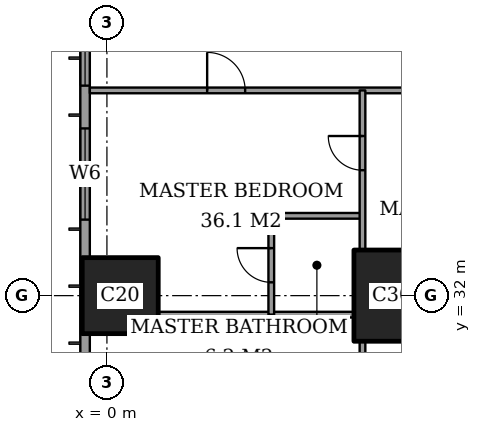
"""IFC4 building model, lengths in metres.
Left out: names, types, materials, properties, quantities, classifications, styles, units other than length and angle.
Written with IfcOpenShell. Run it as: python <this file> out.ifc"""

import sys

from ifc_helpers import new_model, si_unit, direction, frame, frame_2d, origin, origin_2d, place, context, subcontext, project, spatial, rectangle, extrude, element, fill, save


model = new_model("IFC4")
c1 = context("Model", 3, precision=1e-05, world=origin(), true_north=direction((0.0, 1.0)))
c2 = subcontext(c1, "Body", "Model", "MODEL_VIEW")
j1 = project(units=[si_unit("LENGTHUNIT", "METRE"), si_unit("PLANEANGLEUNIT", "RADIAN")], contexts=[c1])
p1 = place(None, origin())
s1 = spatial("IfcSite", under=j1, at=p1, CompositionType="ELEMENT")
p2 = place(p1, origin())
s2 = spatial("IfcBuilding", under=s1, at=p2, CompositionType="ELEMENT")
p3 = place(p2, frame((0.0, 0.0, 62.0)))
s3 = spatial("IfcBuildingStorey", under=s2, at=p3, CompositionType="ELEMENT", Elevation=62.0)
p4 = place(p3, frame((0.35, 32.0, 0.0), z_axis=(0.0, 0.0, 1.0), x_axis=(1.0, 0.0, 0.0)))
e1 = element("IfcColumn", 1, at=p4, inside=s3, PredefinedType="COLUMN", context=c2, shape_type="SweptSolid", body=[
    extrude(rectangle(XDim=2.0, YDim=2.0, at=origin_2d()), origin(), (0.0, 0.0, 1.0), 3.6),
])
p5 = place(p3, frame((8.0, 32.0, 0.0), z_axis=(0.0, 0.0, 1.0), x_axis=(1.0, 0.0, 0.0)))
e2 = element("IfcColumn", 2, at=p5, inside=s3, PredefinedType="COLUMN", context=c2, shape_type="SweptSolid", body=[
    extrude(rectangle(XDim=3.0, YDim=2.4, at=origin_2d()), origin(), (0.0, 0.0, 1.0), 3.6),
])
p6 = place(p3, frame((-0.575, 44.825, 0.0), z_axis=(0.0, 0.0, 1.0), x_axis=(0.0, -1.0, 0.0)))
e3 = element("IfcWall", 3, at=p6, inside=s3, PredefinedType="SOLIDWALL", context=c2, shape_type="SweptSolid", body=[
    extrude(rectangle(XDim=41.65, YDim=0.25, at=frame_2d((20.825, 0.0))), origin(), (0.0, 0.0, 1.0), 3.6),
])
p7 = place(p6, frame((0.775, 0.0, 0.6)))
e4 = element("IfcOpeningElement", 4, at=p7, cuts=e3, PredefinedType="OPENING", context=c2, shape_type="SweptSolid", body=[
    extrude(rectangle(XDim=2.4, YDim=2.0, at=frame_2d((1.2, 1.0))), frame((0.0, 0.135, 0.0), z_axis=(0.0, -1.0, 0.0), x_axis=(1.0, 0.0, 0.0)), (0.0, 0.0, 1.0), 0.27),
])
p8 = place(p6, frame((6.1, 0.0, 0.6)))
e5 = element("IfcOpeningElement", 5, at=p8, cuts=e3, PredefinedType="OPENING", context=c2, shape_type="SweptSolid", body=[
    extrude(rectangle(XDim=1.2, YDim=2.0, at=frame_2d((0.6, 1.0))), frame((0.0, 0.135, 0.0), z_axis=(0.0, -1.0, 0.0), x_axis=(1.0, 0.0, 0.0)), (0.0, 0.0, 1.0), 0.27),
])
p9 = place(p6, frame((8.425, 0.0, 0.6)))
e6 = element("IfcOpeningElement", 6, at=p9, cuts=e3, PredefinedType="OPENING", context=c2, shape_type="SweptSolid", body=[
    extrude(rectangle(XDim=2.4, YDim=2.0, at=frame_2d((1.2, 1.0))), frame((0.0, 0.135, 0.0), z_axis=(0.0, -1.0, 0.0), x_axis=(1.0, 0.0, 0.0)), (0.0, 0.0, 1.0), 0.27),
])
p10 = place(p6, frame((15.625, 0.0, 0.6)))
e7 = element("IfcOpeningElement", 7, at=p10, cuts=e3, PredefinedType="OPENING", context=c2, shape_type="SweptSolid", body=[
    extrude(rectangle(XDim=2.4, YDim=2.0, at=frame_2d((1.2, 1.0))), frame((0.0, 0.135, 0.0), z_axis=(0.0, -1.0, 0.0), x_axis=(1.0, 0.0, 0.0)), (0.0, 0.0, 1.0), 0.27),
])
p11 = place(p6, frame((23.625, 0.0, 0.6)))
e8 = element("IfcOpeningElement", 8, at=p11, cuts=e3, PredefinedType="OPENING", context=c2, shape_type="SweptSolid", body=[
    extrude(rectangle(XDim=2.4, YDim=2.0, at=frame_2d((1.2, 1.0))), frame((0.0, 0.135, 0.0), z_axis=(0.0, -1.0, 0.0), x_axis=(1.0, 0.0, 0.0)), (0.0, 0.0, 1.0), 0.27),
])
p12 = place(p6, frame((30.825, 0.0, 0.6)))
e9 = element("IfcOpeningElement", 9, at=p12, cuts=e3, PredefinedType="OPENING", context=c2, shape_type="SweptSolid", body=[
    extrude(rectangle(XDim=2.4, YDim=2.0, at=frame_2d((1.2, 1.0))), frame((0.0, 0.135, 0.0), z_axis=(0.0, -1.0, 0.0), x_axis=(1.0, 0.0, 0.0)), (0.0, 0.0, 1.0), 0.27),
])
p13 = place(p6, frame((34.5, 0.0, 0.6)))
e10 = element("IfcOpeningElement", 10, at=p13, cuts=e3, PredefinedType="OPENING", context=c2, shape_type="SweptSolid", body=[
    extrude(rectangle(XDim=1.2, YDim=2.0, at=frame_2d((0.6, 1.0))), frame((0.0, 0.135, 0.0), z_axis=(0.0, -1.0, 0.0), x_axis=(1.0, 0.0, 0.0)), (0.0, 0.0, 1.0), 0.27),
])
p14 = place(p6, frame((38.475, 0.0, 0.6)))
e11 = element("IfcOpeningElement", 11, at=p14, cuts=e3, PredefinedType="OPENING", context=c2, shape_type="SweptSolid", body=[
    extrude(rectangle(XDim=2.4, YDim=2.0, at=frame_2d((1.2, 1.0))), frame((0.0, 0.135, 0.0), z_axis=(0.0, -1.0, 0.0), x_axis=(1.0, 0.0, 0.0)), (0.0, 0.0, 1.0), 0.27),
])
p15 = place(p3, frame((1.35, 31.5, 0.0), z_axis=(0.0, 0.0, 1.0), x_axis=(1.0, 0.0, 0.0)))
e12 = element("IfcWall", 12, at=p15, inside=s3, PredefinedType="PARTITIONING", context=c2, shape_type="SweptSolid", body=[
    extrude(rectangle(XDim=5.15, YDim=0.15, at=frame_2d((2.575, 0.0))), origin(), (0.0, 0.0, 1.0), 3.35),
])
p16 = place(p3, frame((4.325, 34.1, 0.0), z_axis=(0.0, 0.0, 1.0), x_axis=(1.0, 0.0, 0.0)))
e13 = element("IfcWall", 13, at=p16, inside=s3, PredefinedType="PARTITIONING", context=c2, shape_type="SweptSolid", body=[
    extrude(rectangle(XDim=2.4, YDim=0.15, at=frame_2d((1.2, 0.0))), origin(), (0.0, 0.0, 1.0), 3.35),
])
p17 = place(p3, frame((-0.45, 37.4, 0.0), z_axis=(0.0, 0.0, 1.0), x_axis=(1.0, 0.0, 0.0)))
e14 = element("IfcWall", 14, at=p17, inside=s3, PredefinedType="PARTITIONING", context=c2, shape_type="SweptSolid", body=[
    extrude(rectangle(XDim=25.011, YDim=0.15, at=frame_2d((12.505, 0.0))), origin(), (0.0, 0.0, 1.0), 3.35),
])
p18 = place(p17, frame((10.65, 0.0, 0.0)))
e15 = element("IfcOpeningElement", 15, at=p18, cuts=e14, PredefinedType="OPENING", context=c2, shape_type="SweptSolid", body=[
    extrude(rectangle(XDim=1.0, YDim=2.1, at=frame_2d((0.5, 1.05))), frame((0.0, 0.085, 0.0), z_axis=(0.0, -1.0, 0.0), x_axis=(1.0, 0.0, 0.0)), (0.0, 0.0, 1.0), 0.17),
])
p19 = place(p17, frame((3.087, 0.0, 0.0)))
e16 = element("IfcOpeningElement", 16, at=p19, cuts=e14, PredefinedType="OPENING", context=c2, shape_type="SweptSolid", body=[
    extrude(rectangle(XDim=1.0, YDim=2.1, at=frame_2d((0.5, 1.05))), frame((0.0, 0.085, 0.0), z_axis=(0.0, -1.0, 0.0), x_axis=(1.0, 0.0, 0.0)), (0.0, 0.0, 1.0), 0.17),
])
p20 = place(p17, frame((13.45, 0.0, 0.0)))
e17 = element("IfcOpeningElement", 17, at=p20, cuts=e14, PredefinedType="OPENING", context=c2, shape_type="SweptSolid", body=[
    extrude(rectangle(XDim=1.0, YDim=2.1, at=frame_2d((0.5, 1.05))), frame((0.0, 0.085, 0.0), z_axis=(0.0, -1.0, 0.0), x_axis=(1.0, 0.0, 0.0)), (0.0, 0.0, 1.0), 0.17),
])
p21 = place(p17, frame((16.55, 0.0, 0.0)))
e18 = element("IfcOpeningElement", 18, at=p21, cuts=e14, PredefinedType="OPENING", context=c2, shape_type="SweptSolid", body=[
    extrude(rectangle(XDim=1.0, YDim=2.1, at=frame_2d((0.5, 1.05))), frame((0.0, 0.085, 0.0), z_axis=(0.0, -1.0, 0.0), x_axis=(1.0, 0.0, 0.0)), (0.0, 0.0, 1.0), 0.17),
])
p22 = place(p17, frame((21.175, 0.0, 0.0)))
e19 = element("IfcOpeningElement", 19, at=p22, cuts=e14, PredefinedType="OPENING", context=c2, shape_type="SweptSolid", body=[
    extrude(rectangle(XDim=1.0, YDim=2.1, at=frame_2d((0.5, 1.05))), frame((0.0, 0.085, 0.0), z_axis=(0.0, -1.0, 0.0), x_axis=(1.0, 0.0, 0.0)), (0.0, 0.0, 1.0), 0.17),
])
p23 = place(p3, frame((4.325, 31.5, 0.0), z_axis=(0.0, 0.0, 1.0), x_axis=(0.0, 1.0, 0.0)))
e20 = element("IfcWall", 20, at=p23, inside=s3, PredefinedType="PARTITIONING", context=c2, shape_type="SweptSolid", body=[
    extrude(rectangle(XDim=2.6, YDim=0.15, at=frame_2d((1.3, 0.0))), origin(), (0.0, 0.0, 1.0), 3.35),
])
p24 = place(p23, frame((0.85, 0.0, 0.0)))
e21 = element("IfcOpeningElement", 21, at=p24, cuts=e20, PredefinedType="OPENING", context=c2, shape_type="SweptSolid", body=[
    extrude(rectangle(XDim=0.9, YDim=2.1, at=frame_2d((0.45, 1.05))), frame((0.0, 0.085, 0.0), z_axis=(0.0, -1.0, 0.0), x_axis=(1.0, 0.0, 0.0)), (0.0, 0.0, 1.0), 0.17),
])
p25 = place(p3, frame((6.725, 28.35, 0.0), z_axis=(0.0, 0.0, 1.0), x_axis=(0.0, 1.0, 0.0)))
e22 = element("IfcWall", 22, at=p25, inside=s3, PredefinedType="PARTITIONING", context=c2, shape_type="SweptSolid", body=[
    extrude(rectangle(XDim=2.45, YDim=0.15, at=frame_2d((1.225, 0.0))), origin(), (0.0, 0.0, 1.0), 3.35),
])
p26 = place(p25, frame((0.913, 0.0, 0.0)))
e23 = element("IfcOpeningElement", 23, at=p26, cuts=e22, PredefinedType="OPENING", context=c2, shape_type="SweptSolid", body=[
    extrude(rectangle(XDim=1.0, YDim=2.1, at=frame_2d((0.5, 1.05))), frame((0.0, 0.085, 0.0), z_axis=(0.0, -1.0, 0.0), x_axis=(1.0, 0.0, 0.0)), (0.0, 0.0, 1.0), 0.17),
])
p27 = place(p3, frame((6.725, 33.2, 0.0), z_axis=(0.0, 0.0, 1.0), x_axis=(0.0, 1.0, 0.0)))
e24 = element("IfcWall", 24, at=p27, inside=s3, PredefinedType="PARTITIONING", context=c2, shape_type="SweptSolid", body=[
    extrude(rectangle(XDim=4.2, YDim=0.15, at=frame_2d((2.1, 0.0))), origin(), (0.0, 0.0, 1.0), 3.35),
])
p28 = place(p27, frame((2.1, 0.0, 0.0)))
e25 = element("IfcOpeningElement", 25, at=p28, cuts=e24, PredefinedType="OPENING", context=c2, shape_type="SweptSolid", body=[
    extrude(rectangle(XDim=0.9, YDim=2.1, at=frame_2d((0.45, 1.05))), frame((0.0, 0.085, 0.0), z_axis=(0.0, -1.0, 0.0), x_axis=(1.0, 0.0, 0.0)), (0.0, 0.0, 1.0), 0.17),
])
p29 = place(p8, origin())
e26 = element("IfcWindow", 26, at=p29, inside=s3, PartitioningType="SINGLE_PANEL", PredefinedType="WINDOW", context=c2, shape_type="SweptSolid", body=[
    extrude(rectangle(XDim=1.2, YDim=2.0, at=frame_2d((0.6, 1.0))), frame((0.0, 0.03, 0.0), z_axis=(0.0, -1.0, 0.0), x_axis=(1.0, 0.0, 0.0)), (0.0, 0.0, 1.0), 0.06),
])
fill(e5, e26)
p30 = place(p9, origin())
e27 = element("IfcWindow", 27, at=p30, inside=s3, PartitioningType="SINGLE_PANEL", PredefinedType="WINDOW", context=c2, shape_type="SweptSolid", body=[
    extrude(rectangle(XDim=2.4, YDim=2.0, at=frame_2d((1.2, 1.0))), frame((0.0, 0.03, 0.0), z_axis=(0.0, -1.0, 0.0), x_axis=(1.0, 0.0, 0.0)), (0.0, 0.0, 1.0), 0.06),
])
fill(e6, e27)
p31 = place(p24, origin())
e28 = element("IfcDoor", 28, at=p31, inside=s3, OperationType="SINGLE_SWING_LEFT", PredefinedType="DOOR", context=c2, shape_type="SweptSolid", body=[
    extrude(rectangle(XDim=0.9, YDim=2.1, at=frame_2d((0.45, 1.05))), frame((0.0, 0.025, 0.0), z_axis=(0.0, -1.0, 0.0), x_axis=(1.0, 0.0, 0.0)), (0.0, 0.0, 1.0), 0.05),
])
fill(e21, e28)
p32 = place(p19, origin())
e29 = element("IfcDoor", 29, at=p32, inside=s3, OperationType="SINGLE_SWING_RIGHT", PredefinedType="DOOR", context=c2, shape_type="SweptSolid", body=[
    extrude(rectangle(XDim=1.0, YDim=2.1, at=frame_2d((0.5, 1.05))), frame((0.0, 0.025, 0.0), z_axis=(0.0, -1.0, 0.0), x_axis=(1.0, 0.0, 0.0)), (0.0, 0.0, 1.0), 0.05),
])
fill(e16, e29)
p33 = place(p28, origin())
e30 = element("IfcDoor", 30, at=p33, inside=s3, OperationType="SINGLE_SWING_LEFT", PredefinedType="DOOR", context=c2, shape_type="SweptSolid", body=[
    extrude(rectangle(XDim=0.9, YDim=2.1, at=frame_2d((0.45, 1.05))), frame((0.0, 0.025, 0.0), z_axis=(0.0, -1.0, 0.0), x_axis=(1.0, 0.0, 0.0)), (0.0, 0.0, 1.0), 0.05),
])
fill(e25, e30)
save(model, sys.argv[1])
